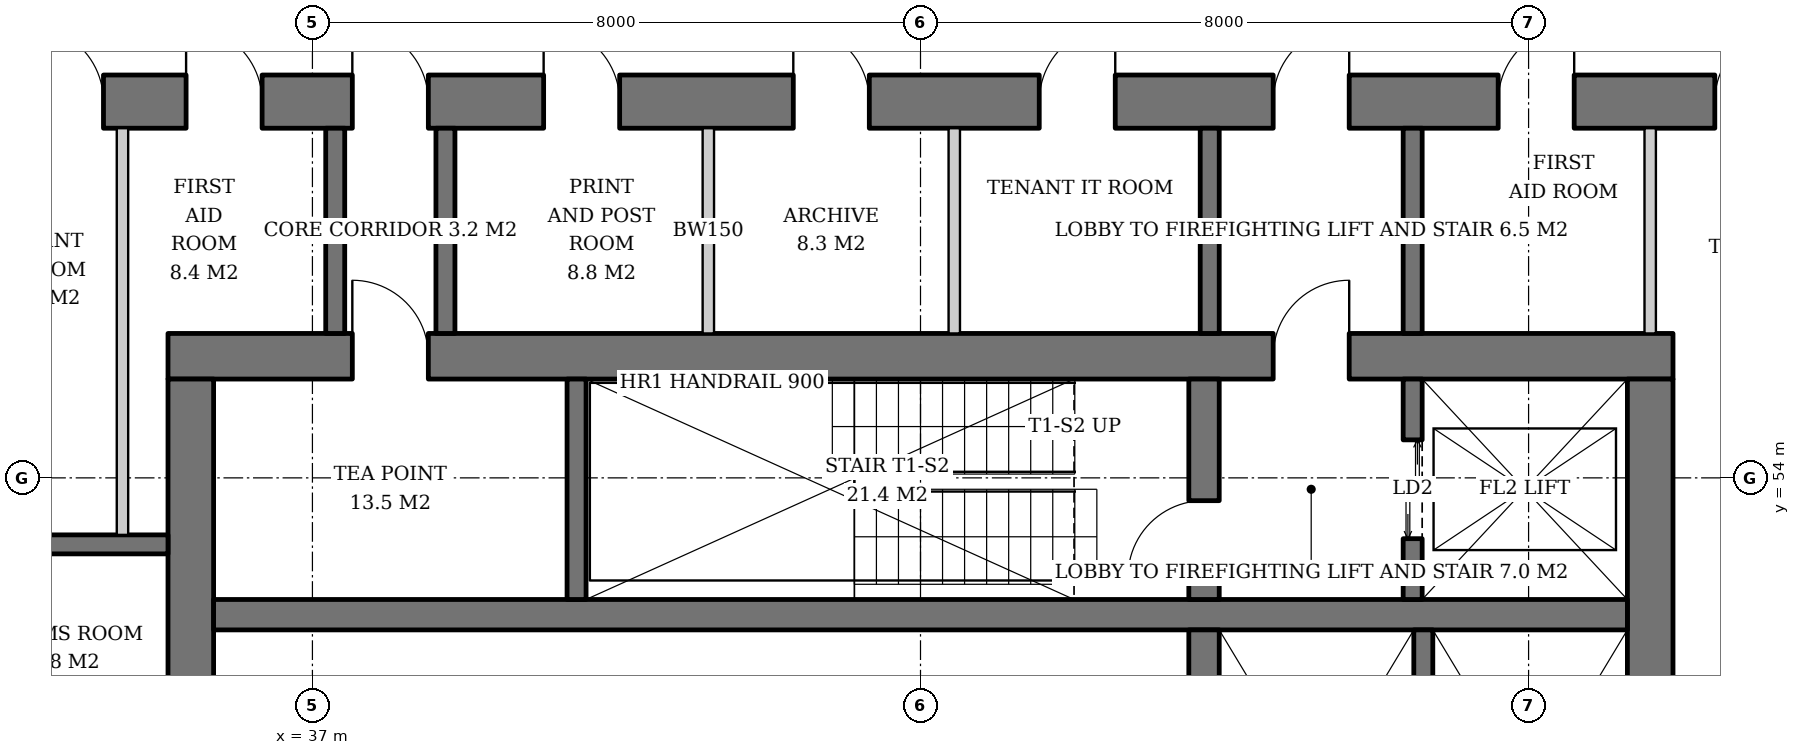
"""IFC4 building model, lengths in metres.
Left out: names, types, materials, properties, quantities, classifications, styles, units other than length and angle.
Written with IfcOpenShell. Run it as: python <this file> out.ifc"""

import sys

from ifc_helpers import new_model, si_unit, direction, frame, frame_2d, origin, place, context, subcontext, project, spatial, rectangle, extrude, element, fill, save


model = new_model("IFC4")
c1 = context("Model", 3, precision=1e-05, world=origin(), true_north=direction((0.0, 1.0)))
c2 = subcontext(c1, "Body", "Model", "MODEL_VIEW")
j1 = project(units=[si_unit("LENGTHUNIT", "METRE"), si_unit("PLANEANGLEUNIT", "RADIAN")], contexts=[c1])
p1 = place(None, origin())
s1 = spatial("IfcSite", under=j1, at=p1, CompositionType="ELEMENT")
p2 = place(p1, origin())
s2 = spatial("IfcBuilding", under=s1, at=p2, CompositionType="ELEMENT")
p3 = place(p2, frame((0.0, 0.0, 146.4)))
s3 = spatial("IfcBuildingStorey", under=s2, at=p3, CompositionType="ELEMENT", Elevation=146.4)
p4 = place(p3, frame((35.1, 55.6, 0.0), z_axis=(0.0, 0.0, 1.0), x_axis=(1.0, 0.0, 0.0)))
e1 = element("IfcWall", 1, at=p4, inside=s3, PredefinedType="SHEAR", context=c2, shape_type="SweptSolid", body=[
    extrude(rectangle(XDim=19.8, YDim=0.6, at=frame_2d((9.9, 0.0))), origin(), (0.0, 0.0, 1.0), 3.8),
])
p5 = place(p4, frame((14.54, 0.0, 0.0)))
e2 = element("IfcOpeningElement", 2, at=p5, cuts=e1, PredefinedType="OPENING", context=c2, shape_type="SweptSolid", body=[
    extrude(rectangle(XDim=1.0, YDim=2.1, at=frame_2d((0.5, 1.05))), frame((0.0, 0.31, 0.0), z_axis=(0.0, -1.0, 0.0), x_axis=(1.0, 0.0, 0.0)), (0.0, 0.0, 1.0), 0.62),
])
p6 = place(p4, frame((2.425, 0.0, 0.0)))
e3 = element("IfcOpeningElement", 3, at=p6, cuts=e1, PredefinedType="OPENING", context=c2, shape_type="SweptSolid", body=[
    extrude(rectangle(XDim=1.0, YDim=2.1, at=frame_2d((0.5, 1.05))), frame((0.0, 0.31, 0.0), z_axis=(0.0, -1.0, 0.0), x_axis=(1.0, 0.0, 0.0)), (0.0, 0.0, 1.0), 0.62),
])
p7 = place(p3, frame((35.4, 36.7, 0.0), z_axis=(0.0, 0.0, 1.0), x_axis=(0.0, 1.0, 0.0)))
e4 = element("IfcWall", 4, at=p7, inside=s3, PredefinedType="SHEAR", context=c2, shape_type="SweptSolid", body=[
    extrude(rectangle(XDim=18.6, YDim=0.6, at=frame_2d((9.3, 0.0))), origin(), (0.0, 0.0, 1.0), 3.8),
])
p8 = place(p7, frame((8.4, 0.0, 0.0)))
e5 = element("IfcOpeningElement", 5, at=p8, cuts=e4, PredefinedType="OPENING", context=c2, shape_type="SweptSolid", body=[
    extrude(rectangle(XDim=1.8, YDim=2.4, at=frame_2d((0.9, 1.2))), frame((0.0, 0.31, 0.0), z_axis=(0.0, -1.0, 0.0), x_axis=(1.0, 0.0, 0.0)), (0.0, 0.0, 1.0), 0.62),
])
p9 = place(p3, frame((54.6, 36.7, 0.0), z_axis=(0.0, 0.0, 1.0), x_axis=(0.0, 1.0, 0.0)))
e6 = element("IfcWall", 6, at=p9, inside=s3, PredefinedType="SHEAR", context=c2, shape_type="SweptSolid", body=[
    extrude(rectangle(XDim=18.6, YDim=0.6, at=frame_2d((9.3, 0.0))), origin(), (0.0, 0.0, 1.0), 3.8),
])
p10 = place(p9, frame((8.4, 0.0, 0.0)))
e7 = element("IfcOpeningElement", 7, at=p10, cuts=e6, PredefinedType="OPENING", context=c2, shape_type="SweptSolid", body=[
    extrude(rectangle(XDim=1.8, YDim=2.4, at=frame_2d((0.9, 1.2))), frame((0.0, 0.31, 0.0), z_axis=(0.0, -1.0, 0.0), x_axis=(1.0, 0.0, 0.0)), (0.0, 0.0, 1.0), 0.62),
])
p11 = place(p3, frame((31.7, 58.95, 0.0), z_axis=(0.0, 0.0, 1.0), x_axis=(1.0, 0.0, 0.0)))
e8 = element("IfcWall", 8, at=p11, inside=s3, PredefinedType="SHEAR", context=c2, shape_type="SweptSolid", body=[
    extrude(rectangle(XDim=26.6, YDim=0.7, at=frame_2d((13.3, 0.0))), origin(), (0.0, 0.0, 1.0), 3.8),
])
p12 = place(p11, frame((17.94, 0.0, 0.0)))
e9 = element("IfcOpeningElement", 9, at=p12, cuts=e8, PredefinedType="OPENING", context=c2, shape_type="SweptSolid", body=[
    extrude(rectangle(XDim=1.0, YDim=2.1, at=frame_2d((0.5, 1.05))), frame((0.0, 0.36, 0.0), z_axis=(0.0, -1.0, 0.0), x_axis=(1.0, 0.0, 0.0)), (0.0, 0.0, 1.0), 0.72),
])
p13 = place(p11, frame((5.825, 0.0, 0.0)))
e10 = element("IfcOpeningElement", 10, at=p13, cuts=e8, PredefinedType="OPENING", context=c2, shape_type="SweptSolid", body=[
    extrude(rectangle(XDim=1.0, YDim=2.1, at=frame_2d((0.5, 1.05))), frame((0.0, 0.36, 0.0), z_axis=(0.0, -1.0, 0.0), x_axis=(1.0, 0.0, 0.0)), (0.0, 0.0, 1.0), 0.72),
])
p14 = place(p11, frame((1.551, 0.0, 0.0)))
e11 = element("IfcOpeningElement", 11, at=p14, cuts=e8, PredefinedType="OPENING", context=c2, shape_type="SweptSolid", body=[
    extrude(rectangle(XDim=1.0, YDim=2.1, at=frame_2d((0.5, 1.05))), frame((0.0, 0.36, 0.0), z_axis=(0.0, -1.0, 0.0), x_axis=(1.0, 0.0, 0.0)), (0.0, 0.0, 1.0), 0.72),
])
p15 = place(p11, frame((3.638, 0.0, 0.0)))
e12 = element("IfcOpeningElement", 12, at=p15, cuts=e8, PredefinedType="OPENING", context=c2, shape_type="SweptSolid", body=[
    extrude(rectangle(XDim=1.0, YDim=2.1, at=frame_2d((0.5, 1.05))), frame((0.0, 0.36, 0.0), z_axis=(0.0, -1.0, 0.0), x_axis=(1.0, 0.0, 0.0)), (0.0, 0.0, 1.0), 0.72),
])
p16 = place(p11, frame((8.342, 0.0, 0.0)))
e13 = element("IfcOpeningElement", 13, at=p16, cuts=e8, PredefinedType="OPENING", context=c2, shape_type="SweptSolid", body=[
    extrude(rectangle(XDim=1.0, YDim=2.1, at=frame_2d((0.5, 1.05))), frame((0.0, 0.36, 0.0), z_axis=(0.0, -1.0, 0.0), x_axis=(1.0, 0.0, 0.0)), (0.0, 0.0, 1.0), 0.72),
])
p17 = place(p11, frame((11.626, 0.0, 0.0)))
e14 = element("IfcOpeningElement", 14, at=p17, cuts=e8, PredefinedType="OPENING", context=c2, shape_type="SweptSolid", body=[
    extrude(rectangle(XDim=1.0, YDim=2.1, at=frame_2d((0.5, 1.05))), frame((0.0, 0.36, 0.0), z_axis=(0.0, -1.0, 0.0), x_axis=(1.0, 0.0, 0.0)), (0.0, 0.0, 1.0), 0.72),
])
p18 = place(p11, frame((14.862, 0.0, 0.0)))
e15 = element("IfcOpeningElement", 15, at=p18, cuts=e8, PredefinedType="OPENING", context=c2, shape_type="SweptSolid", body=[
    extrude(rectangle(XDim=1.0, YDim=2.1, at=frame_2d((0.5, 1.05))), frame((0.0, 0.36, 0.0), z_axis=(0.0, -1.0, 0.0), x_axis=(1.0, 0.0, 0.0)), (0.0, 0.0, 1.0), 0.72),
])
p19 = place(p11, frame((20.9, 0.0, 0.0)))
e16 = element("IfcOpeningElement", 16, at=p19, cuts=e8, PredefinedType="OPENING", context=c2, shape_type="SweptSolid", body=[
    extrude(rectangle(XDim=1.0, YDim=2.1, at=frame_2d((0.5, 1.05))), frame((0.0, 0.36, 0.0), z_axis=(0.0, -1.0, 0.0), x_axis=(1.0, 0.0, 0.0)), (0.0, 0.0, 1.0), 0.72),
])
p20 = place(p11, frame((23.75, 0.0, 0.0)))
e17 = element("IfcOpeningElement", 17, at=p20, cuts=e8, PredefinedType="OPENING", context=c2, shape_type="SweptSolid", body=[
    extrude(rectangle(XDim=1.0, YDim=2.1, at=frame_2d((0.5, 1.05))), frame((0.0, 0.36, 0.0), z_axis=(0.0, -1.0, 0.0), x_axis=(1.0, 0.0, 0.0)), (0.0, 0.0, 1.0), 0.72),
])
p21 = place(p3, frame((35.7, 52.2, 0.0), z_axis=(0.0, 0.0, 1.0), x_axis=(1.0, 0.0, 0.0)))
e18 = element("IfcWall", 18, at=p21, inside=s3, PredefinedType="SHEAR", context=c2, shape_type="SweptSolid", body=[
    extrude(rectangle(XDim=18.6, YDim=0.4, at=frame_2d((9.3, 0.0))), origin(), (0.0, 0.0, 1.0), 3.8),
])
p22 = place(p3, frame((48.73, 40.0, 0.0), z_axis=(0.0, 0.0, 1.0), x_axis=(0.0, 1.0, 0.0)))
e19 = element("IfcWall", 19, at=p22, inside=s3, PredefinedType="SHEAR", context=c2, shape_type="SweptSolid", body=[
    extrude(rectangle(XDim=12.0, YDim=0.4, at=frame_2d((6.0, 0.0))), origin(), (0.0, 0.0, 1.0), 3.8),
])
p23 = place(p3, frame((48.73, 52.4, 0.0), z_axis=(0.0, 0.0, 1.0), x_axis=(0.0, 1.0, 0.0)))
e20 = element("IfcWall", 20, at=p23, inside=s3, PredefinedType="SHEAR", context=c2, shape_type="SweptSolid", body=[
    extrude(rectangle(XDim=2.9, YDim=0.4, at=frame_2d((1.45, 0.0))), origin(), (0.0, 0.0, 1.0), 3.8),
])
p24 = place(p23, frame((0.3, 0.0, 0.0)))
e21 = element("IfcOpeningElement", 21, at=p24, cuts=e20, PredefinedType="OPENING", context=c2, shape_type="SweptSolid", body=[
    extrude(rectangle(XDim=1.0, YDim=2.1, at=frame_2d((0.5, 1.05))), frame((0.0, 0.21, 0.0), z_axis=(0.0, -1.0, 0.0), x_axis=(1.0, 0.0, 0.0)), (0.0, 0.0, 1.0), 0.42),
])
p25 = place(p3, frame((40.475, 52.4, 0.0), z_axis=(0.0, 0.0, 1.0), x_axis=(0.0, 1.0, 0.0)))
e22 = element("IfcWall", 22, at=p25, inside=s3, PredefinedType="SHEAR", context=c2, shape_type="SweptSolid", body=[
    extrude(rectangle(XDim=2.9, YDim=0.25, at=frame_2d((1.45, 0.0))), origin(), (0.0, 0.0, 1.0), 3.8),
])
p26 = place(p3, frame((51.475, 52.4, 0.0), z_axis=(0.0, 0.0, 1.0), x_axis=(0.0, 1.0, 0.0)))
e23 = element("IfcWall", 23, at=p26, inside=s3, PredefinedType="SHEAR", context=c2, shape_type="SweptSolid", body=[
    extrude(rectangle(XDim=2.9, YDim=0.25, at=frame_2d((1.45, 0.0))), origin(), (0.0, 0.0, 1.0), 3.8),
])
p27 = place(p26, frame((0.8, 0.0, 0.0)))
e24 = element("IfcOpeningElement", 24, at=p27, cuts=e23, PredefinedType="OPENING", context=c2, shape_type="SweptSolid", body=[
    extrude(rectangle(XDim=1.3, YDim=2.2, at=frame_2d((0.65, 1.1))), frame((0.0, 0.135, 0.0), z_axis=(0.0, -1.0, 0.0), x_axis=(1.0, 0.0, 0.0)), (0.0, 0.0, 1.0), 0.27),
])
p28 = place(p3, frame((51.615, 47.75, 0.0), z_axis=(0.0, 0.0, 1.0), x_axis=(0.0, 1.0, 0.0)))
e25 = element("IfcWall", 25, at=p28, inside=s3, PredefinedType="SHEAR", context=c2, shape_type="SweptSolid", body=[
    extrude(rectangle(XDim=4.25, YDim=0.25, at=frame_2d((2.125, 0.0))), origin(), (0.0, 0.0, 1.0), 3.8),
])
p29 = place(p3, frame((32.4, 53.125, 0.0), z_axis=(0.0, 0.0, 1.0), x_axis=(1.0, 0.0, 0.0)))
e26 = element("IfcWall", 26, at=p29, inside=s3, PredefinedType="SHEAR", context=c2, shape_type="SweptSolid", body=[
    extrude(rectangle(XDim=2.7, YDim=0.25, at=frame_2d((1.35, 0.0))), origin(), (0.0, 0.0, 1.0), 3.8),
])
for number, where, z_axis, x_axis in (
    (27, (48.805, 55.9, 0.0), (0.0, 0.0, 1.0), (0.0, 1.0, 0.0)),
    (28, (51.475, 55.9, 0.0), (0.0, 0.0, 1.0), (0.0, 1.0, 0.0)),
    (29, (37.3, 55.9, 0.0), (0.0, 0.0, 1.0), (0.0, 1.0, 0.0)),
    (30, (38.75, 55.9, 0.0), (0.0, 0.0, 1.0), (0.0, 1.0, 0.0)),
):
    element("IfcWall", number, at=place(p3, frame(where, z_axis=z_axis, x_axis=x_axis)), inside=s3, PredefinedType="SOLIDWALL", context=c2, shape_type="SweptSolid", body=[
        extrude(rectangle(XDim=2.7, YDim=0.25, at=frame_2d((1.35, 0.0))), origin(), (0.0, 0.0, 1.0), 3.62),
    ])
p30 = place(p3, frame((34.501, 53.25, 0.0), z_axis=(0.0, 0.0, 1.0), x_axis=(0.0, 1.0, 0.0)))
e31 = element("IfcWall", 31, at=p30, inside=s3, PredefinedType="SOLIDWALL", context=c2, shape_type="SweptSolid", body=[
    extrude(rectangle(XDim=5.35, YDim=0.15, at=frame_2d((2.675, 0.0))), origin(), (0.0, 0.0, 1.0), 3.62),
])
for number, where, z_axis, x_axis in (
    (32, (42.209, 55.9, 0.0), (0.0, 0.0, 1.0), (0.0, 1.0, 0.0)),
    (33, (45.444, 55.9, 0.0), (0.0, 0.0, 1.0), (0.0, 1.0, 0.0)),
    (34, (54.6, 55.9, 0.0), (0.0, 0.0, 1.0), (0.0, 1.0, 0.0)),
):
    element("IfcWall", number, at=place(p3, frame(where, z_axis=z_axis, x_axis=x_axis)), inside=s3, PredefinedType="SOLIDWALL", context=c2, shape_type="SweptSolid", body=[
        extrude(rectangle(XDim=2.7, YDim=0.15, at=frame_2d((1.35, 0.0))), origin(), (0.0, 0.0, 1.0), 3.62),
    ])
p31 = place(p27, origin())
e35 = element("IfcDoor", 35, at=p31, inside=s3, OperationType="DOUBLE_DOOR_SLIDING", PredefinedType="DOOR", context=c2, shape_type="SweptSolid", body=[
    extrude(rectangle(XDim=1.3, YDim=2.2, at=frame_2d((0.65, 1.1))), frame((0.0, 0.025, 0.0), z_axis=(0.0, -1.0, 0.0), x_axis=(1.0, 0.0, 0.0)), (0.0, 0.0, 1.0), 0.05),
])
fill(e24, e35)
p32 = place(p24, origin())
e36 = element("IfcDoor", 36, at=p32, inside=s3, OperationType="SINGLE_SWING_LEFT", PredefinedType="DOOR", context=c2, shape_type="SweptSolid", body=[
    extrude(rectangle(XDim=1.0, YDim=2.1, at=frame_2d((0.5, 1.05))), frame((0.0, 0.025, 0.0), z_axis=(0.0, -1.0, 0.0), x_axis=(1.0, 0.0, 0.0)), (0.0, 0.0, 1.0), 0.05),
])
fill(e21, e36)
p33 = place(p5, origin())
e37 = element("IfcDoor", 37, at=p33, inside=s3, OperationType="SINGLE_SWING_RIGHT", PredefinedType="DOOR", context=c2, shape_type="SweptSolid", body=[
    extrude(rectangle(XDim=1.0, YDim=2.1, at=frame_2d((0.5, 1.05))), frame((0.0, 0.025, 0.0), z_axis=(0.0, -1.0, 0.0), x_axis=(1.0, 0.0, 0.0)), (0.0, 0.0, 1.0), 0.05),
])
fill(e2, e37)
p34 = place(p12, origin())
e38 = element("IfcDoor", 38, at=p34, inside=s3, OperationType="SINGLE_SWING_RIGHT", PredefinedType="DOOR", context=c2, shape_type="SweptSolid", body=[
    extrude(rectangle(XDim=1.0, YDim=2.1, at=frame_2d((0.5, 1.05))), frame((0.0, 0.025, 0.0), z_axis=(0.0, -1.0, 0.0), x_axis=(1.0, 0.0, 0.0)), (0.0, 0.0, 1.0), 0.05),
])
fill(e9, e38)
p35 = place(p13, origin())
e39 = element("IfcDoor", 39, at=p35, inside=s3, OperationType="SINGLE_SWING_LEFT", PredefinedType="DOOR", context=c2, shape_type="SweptSolid", body=[
    extrude(rectangle(XDim=1.0, YDim=2.1, at=frame_2d((0.5, 1.05))), frame((0.0, 0.025, 0.0), z_axis=(0.0, -1.0, 0.0), x_axis=(1.0, 0.0, 0.0)), (0.0, 0.0, 1.0), 0.05),
])
fill(e10, e39)
p36 = place(p6, origin())
e40 = element("IfcDoor", 40, at=p36, inside=s3, OperationType="SINGLE_SWING_LEFT", PredefinedType="DOOR", context=c2, shape_type="SweptSolid", body=[
    extrude(rectangle(XDim=1.0, YDim=2.1, at=frame_2d((0.5, 1.05))), frame((0.0, -0.24, 0.0), z_axis=(0.0, -1.0, 0.0), x_axis=(1.0, 0.0, 0.0)), (0.0, 0.0, 1.0), 0.05),
])
fill(e3, e40)
p37 = place(p14, origin())
e41 = element("IfcDoor", 41, at=p37, inside=s3, OperationType="SINGLE_SWING_LEFT", PredefinedType="DOOR", context=c2, shape_type="SweptSolid", body=[
    extrude(rectangle(XDim=1.0, YDim=2.1, at=frame_2d((0.5, 1.05))), frame((0.0, -0.29, 0.0), z_axis=(0.0, -1.0, 0.0), x_axis=(1.0, 0.0, 0.0)), (0.0, 0.0, 1.0), 0.05),
])
fill(e11, e41)
p38 = place(p15, origin())
e42 = element("IfcDoor", 42, at=p38, inside=s3, OperationType="SINGLE_SWING_LEFT", PredefinedType="DOOR", context=c2, shape_type="SweptSolid", body=[
    extrude(rectangle(XDim=1.0, YDim=2.1, at=frame_2d((0.5, 1.05))), frame((0.0, -0.29, 0.0), z_axis=(0.0, -1.0, 0.0), x_axis=(1.0, 0.0, 0.0)), (0.0, 0.0, 1.0), 0.05),
])
fill(e12, e42)
p39 = place(p16, origin())
e43 = element("IfcDoor", 43, at=p39, inside=s3, OperationType="SINGLE_SWING_LEFT", PredefinedType="DOOR", context=c2, shape_type="SweptSolid", body=[
    extrude(rectangle(XDim=1.0, YDim=2.1, at=frame_2d((0.5, 1.05))), frame((0.0, -0.29, 0.0), z_axis=(0.0, -1.0, 0.0), x_axis=(1.0, 0.0, 0.0)), (0.0, 0.0, 1.0), 0.05),
])
fill(e13, e43)
p40 = place(p17, origin())
e44 = element("IfcDoor", 44, at=p40, inside=s3, OperationType="SINGLE_SWING_LEFT", PredefinedType="DOOR", context=c2, shape_type="SweptSolid", body=[
    extrude(rectangle(XDim=1.0, YDim=2.1, at=frame_2d((0.5, 1.05))), frame((0.0, -0.29, 0.0), z_axis=(0.0, -1.0, 0.0), x_axis=(1.0, 0.0, 0.0)), (0.0, 0.0, 1.0), 0.05),
])
fill(e14, e44)
p41 = place(p18, origin())
e45 = element("IfcDoor", 45, at=p41, inside=s3, OperationType="SINGLE_SWING_RIGHT", PredefinedType="DOOR", context=c2, shape_type="SweptSolid", body=[
    extrude(rectangle(XDim=1.0, YDim=2.1, at=frame_2d((0.5, 1.05))), frame((0.0, -0.29, 0.0), z_axis=(0.0, -1.0, 0.0), x_axis=(1.0, 0.0, 0.0)), (0.0, 0.0, 1.0), 0.05),
])
fill(e15, e45)
p42 = place(p19, origin())
e46 = element("IfcDoor", 46, at=p42, inside=s3, OperationType="SINGLE_SWING_RIGHT", PredefinedType="DOOR", context=c2, shape_type="SweptSolid", body=[
    extrude(rectangle(XDim=1.0, YDim=2.1, at=frame_2d((0.5, 1.05))), frame((0.0, -0.29, 0.0), z_axis=(0.0, -1.0, 0.0), x_axis=(1.0, 0.0, 0.0)), (0.0, 0.0, 1.0), 0.05),
])
fill(e16, e46)
p43 = place(p20, origin())
e47 = element("IfcDoor", 47, at=p43, inside=s3, OperationType="SINGLE_SWING_RIGHT", PredefinedType="DOOR", context=c2, shape_type="SweptSolid", body=[
    extrude(rectangle(XDim=1.0, YDim=2.1, at=frame_2d((0.5, 1.05))), frame((0.0, -0.29, 0.0), z_axis=(0.0, -1.0, 0.0), x_axis=(1.0, 0.0, 0.0)), (0.0, 0.0, 1.0), 0.05),
])
fill(e17, e47)
save(model, sys.argv[1])
